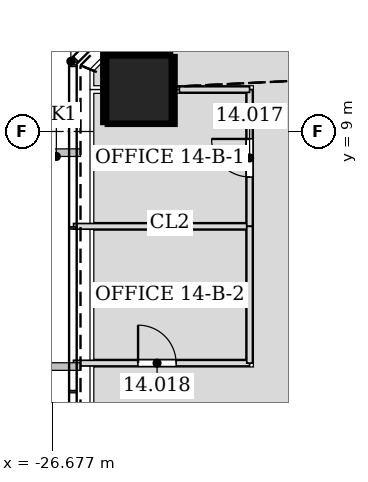
"""IFC4 building model, lengths in metres.
Left out: names, types, materials, properties, quantities, classifications, styles, units other than length and angle.
Written with IfcOpenShell. Run it as: python <this file> out.ifc"""

import sys

from ifc_helpers import new_model, si_unit, direction, frame, frame_2d, origin, origin_2d, place, context, subcontext, project, spatial, rectangle, hollow_rectangle, extrude, element, fill, save


model = new_model("IFC4")
c1 = context("Model", 3, precision=1e-05, world=origin(), true_north=direction((0.0, 1.0)))
c2 = subcontext(c1, "Body", "Model", "MODEL_VIEW")
j1 = project(units=[si_unit("LENGTHUNIT", "METRE"), si_unit("PLANEANGLEUNIT", "RADIAN")], contexts=[c1])
p1 = place(None, origin())
s1 = spatial("IfcSite", under=j1, at=p1, CompositionType="ELEMENT")
p2 = place(p1, origin())
s2 = spatial("IfcBuilding", under=s1, at=p2, CompositionType="ELEMENT")
p3 = place(p2, frame((0.0, 0.0, 66.6)))
s3 = spatial("IfcBuildingStorey", under=s2, at=p3, CompositionType="ELEMENT", Elevation=66.6)
p4 = place(p3, frame((-24.452, 10.129, 0.0), z_axis=(0.028237674468, -0.01173664659, 0.999532333078), x_axis=(0.38380575713, 0.923413851312, 0.0)))
e1 = element("IfcColumn", 1, at=p4, inside=s3, PredefinedType="COLUMN", context=c2, shape_type="SweptSolid", body=[
    extrude(hollow_rectangle(XDim=1.8, YDim=1.8, WallThickness=0.085, at=origin_2d()), origin(), (0.0, 0.0, 1.0), 4.202),
])
p5 = place(p3, frame((-26.113, 6.504, 0.0), z_axis=(0.0, 0.0, 1.0), x_axis=(1.0, 0.0, 0.0)))
e2 = element("IfcWall", 2, at=p5, inside=s3, PredefinedType="PARTITIONING", context=c2, shape_type="SweptSolid", body=[
    extrude(rectangle(XDim=4.632, YDim=0.15, at=frame_2d((2.316, 0.0))), origin(), (0.0, 0.0, 1.0), 3.423),
])
p6 = place(p3, frame((-21.481, 6.504, 0.0), z_axis=(0.0, 0.0, 1.0), x_axis=(0.0, 1.0, 0.0)))
e3 = element("IfcWall", 3, at=p6, inside=s3, PredefinedType="PARTITIONING", context=c2, shape_type="SweptSolid", body=[
    extrude(rectangle(XDim=3.6, YDim=0.15, at=frame_2d((1.8, 0.0))), origin(), (0.0, 0.0, 1.0), 3.014),
])
p7 = place(p6, frame((1.3, 0.0, 0.0)))
e4 = element("IfcOpeningElement", 4, at=p7, cuts=e3, PredefinedType="OPENING", context=c2, shape_type="SweptSolid", body=[
    extrude(rectangle(XDim=1.0, YDim=2.1, at=frame_2d((0.5, 1.05))), frame((0.0, 0.085, 0.0), z_axis=(0.0, -1.0, 0.0), x_axis=(1.0, 0.0, 0.0)), (0.0, 0.0, 1.0), 0.17),
])
p8 = place(p3, frame((-21.481, 10.104, 0.0), z_axis=(0.0, 0.0, 1.0), x_axis=(-1.0, 0.0, 0.0)))
e5 = element("IfcWall", 5, at=p8, inside=s3, PredefinedType="PARTITIONING", context=c2, shape_type="SweptSolid", body=[
    extrude(rectangle(XDim=1.848, YDim=0.15, at=frame_2d((0.924, 0.0))), origin(), (0.0, 0.0, 1.0), 3.014),
])
p9 = place(p3, frame((-26.115, 2.904, 0.0), z_axis=(0.0, 0.0, 1.0), x_axis=(1.0, 0.0, 0.0)))
e6 = element("IfcWall", 6, at=p9, inside=s3, PredefinedType="PARTITIONING", context=c2, shape_type="SweptSolid", body=[
    extrude(rectangle(XDim=4.634, YDim=0.15, at=frame_2d((2.317, 0.0))), origin(), (0.0, 0.0, 1.0), 3.423),
])
p10 = place(p9, frame((1.699, 0.0, 0.0)))
e7 = element("IfcOpeningElement", 7, at=p10, cuts=e6, PredefinedType="OPENING", context=c2, shape_type="SweptSolid", body=[
    extrude(rectangle(XDim=1.0, YDim=2.1, at=frame_2d((0.5, 1.05))), frame((0.0, 0.085, 0.0), z_axis=(0.0, -1.0, 0.0), x_axis=(1.0, 0.0, 0.0)), (0.0, 0.0, 1.0), 0.17),
])
p11 = place(p3, frame((-21.481, 2.904, 0.0), z_axis=(0.0, 0.0, 1.0), x_axis=(0.0, 1.0, 0.0)))
e8 = element("IfcWall", 8, at=p11, inside=s3, PredefinedType="PARTITIONING", context=c2, shape_type="SweptSolid", body=[
    extrude(rectangle(XDim=3.6, YDim=0.15, at=frame_2d((1.8, 0.0))), origin(), (0.0, 0.0, 1.0), 4.035),
])
p12 = place(p7, origin())
e9 = element("IfcDoor", 9, at=p12, inside=s3, OperationType="SINGLE_SWING_RIGHT", PredefinedType="DOOR", context=c2, shape_type="SweptSolid", body=[
    extrude(rectangle(XDim=1.0, YDim=2.1, at=frame_2d((0.5, 1.05))), frame((0.0, 0.025, 0.0), z_axis=(0.0, -1.0, 0.0), x_axis=(1.0, 0.0, 0.0)), (0.0, 0.0, 1.0), 0.05),
])
fill(e4, e9)
p13 = place(p10, origin())
e10 = element("IfcDoor", 10, at=p13, inside=s3, OperationType="SINGLE_SWING_LEFT", PredefinedType="DOOR", context=c2, shape_type="SweptSolid", body=[
    extrude(rectangle(XDim=1.0, YDim=2.1, at=frame_2d((0.5, 1.05))), frame((0.0, 0.025, 0.0), z_axis=(0.0, -1.0, 0.0), x_axis=(1.0, 0.0, 0.0)), (0.0, 0.0, 1.0), 0.05),
])
fill(e7, e10)
save(model, sys.argv[1])
